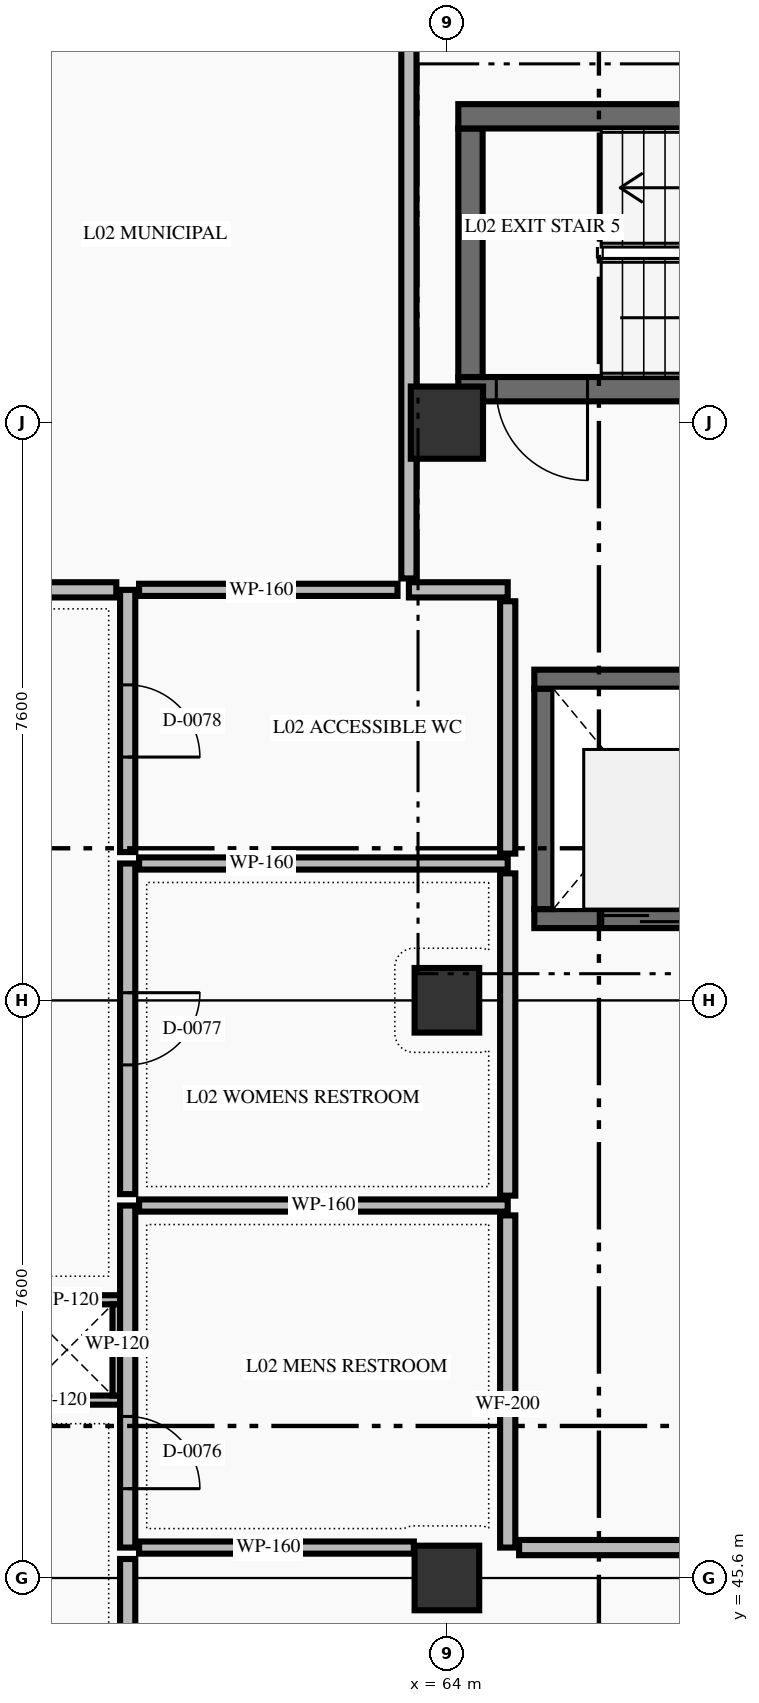
"""IFC4 building model, lengths in metres.
Left out: names, types, materials, properties, quantities, classifications, styles, units other than length and angle.
Written with IfcOpenShell. Run it as: python <this file> out.ifc"""

import sys

from ifc_helpers import new_model, si_unit, direction, frame, frame_2d, origin, origin_2d, place, context, subcontext, project, spatial, rectangle, extrude, element, fill, save


model = new_model("IFC4")
c1 = context("Model", 3, precision=1e-05, world=origin(), true_north=direction((0.0, 1.0)))
c2 = subcontext(c1, "Body", "Model", "MODEL_VIEW")
j1 = project(units=[si_unit("LENGTHUNIT", "METRE"), si_unit("PLANEANGLEUNIT", "RADIAN")], contexts=[c1])
p1 = place(None, origin())
s1 = spatial("IfcSite", under=j1, at=p1, CompositionType="ELEMENT")
p2 = place(p1, origin())
s2 = spatial("IfcBuilding", under=s1, at=p2, CompositionType="ELEMENT")
p3 = place(p2, frame((0.0, 0.0, 5.4)))
s3 = spatial("IfcBuildingStorey", under=s2, at=p3, CompositionType="ELEMENT", Elevation=5.4)
for number, where, z_axis, x_axis in (
    (1, (64.0, 45.6, 0.0), (0.0, 0.0, 1.0), (1.0, 0.0, 0.0)),
    (2, (64.0, 53.2, 0.0), (0.0, 0.0, 1.0), (1.0, 0.0, 0.0)),
):
    element("IfcColumn", number, at=place(p3, frame(where, z_axis=z_axis, x_axis=x_axis)), inside=s3, PredefinedType="COLUMN", context=c2, shape_type="SweptSolid", body=[
        extrude(rectangle(XDim=0.85, YDim=0.85, at=origin_2d()), origin(), (0.0, 0.0, 1.0), 4.8),
    ])
p4 = place(p3, frame((64.0, 60.8, 0.0), z_axis=(0.0, 0.0, 1.0), x_axis=(1.0, 0.0, 0.0)))
e3 = element("IfcColumn", 3, at=p4, inside=s3, PredefinedType="COLUMN", context=c2, shape_type="SweptSolid", body=[
    extrude(rectangle(XDim=0.95, YDim=0.95, at=origin_2d()), origin(), (0.0, 0.0, 1.0), 4.8),
])
p5 = place(p3, frame((71.85, 61.24, 0.0), z_axis=(0.0, 0.0, 1.0), x_axis=(-1.0, 0.0, 0.0)))
e4 = element("IfcWall", 4, at=p5, inside=s3, PredefinedType="SHEAR", context=c2, shape_type="SweptSolid", body=[
    extrude(rectangle(XDim=7.7, YDim=0.32, at=frame_2d((3.85, 0.0))), origin(), (0.0, 0.0, 1.0), 4.8),
])
p6 = place(p5, frame((6.0, 0.0, 0.0)))
e5 = element("IfcOpeningElement", 5, at=p6, cuts=e4, PredefinedType="OPENING", context=c2, shape_type="SweptSolid", body=[
    extrude(rectangle(XDim=1.2, YDim=2.2, at=frame_2d((0.6, 1.1))), frame((0.0, 0.17, 0.0), z_axis=(0.0, -1.0, 0.0), x_axis=(1.0, 0.0, 0.0)), (0.0, 0.0, 1.0), 0.34),
])
p7 = place(p3, frame((64.31, 61.4, 0.0), z_axis=(0.0, 0.0, 1.0), x_axis=(0.0, 1.0, 0.0)))
e6 = element("IfcWall", 6, at=p7, inside=s3, PredefinedType="SHEAR", context=c2, shape_type="SweptSolid", body=[
    extrude(rectangle(XDim=3.27, YDim=0.32, at=frame_2d((1.635, 0.0))), origin(), (0.0, 0.0, 1.0), 4.8),
])
p8 = place(p3, frame((64.15, 64.83, 0.0), z_axis=(0.0, 0.0, 1.0), x_axis=(1.0, 0.0, 0.0)))
e7 = element("IfcWall", 7, at=p8, inside=s3, PredefinedType="SHEAR", context=c2, shape_type="SweptSolid", body=[
    extrude(rectangle(XDim=7.7, YDim=0.32, at=frame_2d((3.85, 0.0))), origin(), (0.0, 0.0, 1.0), 4.8),
])
p9 = place(p3, frame((68.05, 54.275, 0.0), z_axis=(0.0, 0.0, 1.0), x_axis=(-1.0, 0.0, 0.0)))
e8 = element("IfcWall", 8, at=p9, inside=s3, PredefinedType="SHEAR", context=c2, shape_type="SweptSolid", body=[
    extrude(rectangle(XDim=2.9, YDim=0.25, at=frame_2d((1.45, 0.0))), origin(), (0.0, 0.0, 1.0), 4.8),
])
p10 = place(p9, frame((0.9, 0.0, 0.0)))
e9 = element("IfcOpeningElement", 9, at=p10, cuts=e8, PredefinedType="OPENING", context=c2, shape_type="SweptSolid", body=[
    extrude(rectangle(XDim=1.1, YDim=2.15, at=frame_2d((0.55, 1.075))), frame((0.0, 0.135, 0.0), z_axis=(0.0, -1.0, 0.0), x_axis=(1.0, 0.0, 0.0)), (0.0, 0.0, 1.0), 0.27),
])
for number, where, z_axis, x_axis in (
    (10, (65.275, 54.4, 0.0), (0.0, 0.0, 1.0), (0.0, 1.0, 0.0)),
    (11, (65.15, 57.425, 0.0), (0.0, 0.0, 1.0), (1.0, 0.0, 0.0)),
):
    element("IfcWall", number, at=place(p3, frame(where, z_axis=z_axis, x_axis=x_axis)), inside=s3, PredefinedType="SHEAR", context=c2, shape_type="SweptSolid", body=[
        extrude(rectangle(XDim=2.9, YDim=0.25, at=frame_2d((1.45, 0.0))), origin(), (0.0, 0.0, 1.0), 4.8),
    ])
for number, where, z_axis, x_axis in (
    (12, (59.72, 47.94, 0.0), (0.0, 0.0, 1.0), (-1.0, 0.0, 0.0)),
    (13, (58.28, 49.26, 0.0), (0.0, 0.0, 1.0), (1.0, 0.0, 0.0)),
):
    element("IfcWall", number, at=place(p3, frame(where, z_axis=z_axis, x_axis=x_axis)), inside=s3, PredefinedType="PARTITIONING", context=c2, shape_type="SweptSolid", body=[
        extrude(rectangle(XDim=1.44, YDim=0.12, at=frame_2d((0.72, 0.0))), origin(), (0.0, 0.0, 1.0), 4.54),
    ])
p11 = place(p3, frame((59.66, 49.2, 0.0), z_axis=(0.0, 0.0, 1.0), x_axis=(0.0, -1.0, 0.0)))
e14 = element("IfcWall", 14, at=p11, inside=s3, PredefinedType="PARTITIONING", context=c2, shape_type="SweptSolid", body=[
    extrude(rectangle(XDim=1.2, YDim=0.12, at=frame_2d((0.6, 0.0))), origin(), (0.0, 0.0, 1.0), 4.54),
])
p12 = place(p3, frame((59.8, 50.5, 0.0), z_axis=(0.0, 0.0, 1.0), x_axis=(0.0, -1.0, 0.0)))
e15 = element("IfcWall", 15, at=p12, inside=s3, PredefinedType="STANDARD", context=c2, shape_type="SweptSolid", body=[
    extrude(rectangle(XDim=4.5, YDim=0.2, at=frame_2d((2.25, 0.0))), origin(), (0.0, 0.0, 1.0), 4.04),
])
p13 = place(p12, frame((2.775, 0.0, 0.0)))
e16 = element("IfcOpeningElement", 16, at=p13, cuts=e15, PredefinedType="OPENING", context=c2, shape_type="SweptSolid", body=[
    extrude(rectangle(XDim=0.95, YDim=2.15, at=frame_2d((0.475, 1.075))), frame((0.0, 0.11, 0.0), z_axis=(0.0, -1.0, 0.0), x_axis=(1.0, 0.0, 0.0)), (0.0, 0.0, 1.0), 0.22),
])
p14 = place(p3, frame((59.8, 55.0, 0.0), z_axis=(0.0, 0.0, 1.0), x_axis=(0.0, -1.0, 0.0)))
e17 = element("IfcWall", 17, at=p14, inside=s3, PredefinedType="STANDARD", context=c2, shape_type="SweptSolid", body=[
    extrude(rectangle(XDim=4.35, YDim=0.2, at=frame_2d((2.175, 0.0))), origin(), (0.0, 0.0, 1.0), 4.04),
])
p15 = place(p14, frame((1.7, 0.0, 0.0)))
e18 = element("IfcOpeningElement", 18, at=p15, cuts=e17, PredefinedType="OPENING", context=c2, shape_type="SweptSolid", body=[
    extrude(rectangle(XDim=0.95, YDim=2.15, at=frame_2d((0.475, 1.075))), frame((0.0, 0.11, 0.0), z_axis=(0.0, -1.0, 0.0), x_axis=(1.0, 0.0, 0.0)), (0.0, 0.0, 1.0), 0.22),
])
p16 = place(p3, frame((59.8, 58.6, 0.0), z_axis=(0.0, 0.0, 1.0), x_axis=(0.0, -1.0, 0.0)))
e19 = element("IfcWall", 19, at=p16, inside=s3, PredefinedType="STANDARD", context=c2, shape_type="SweptSolid", body=[
    extrude(rectangle(XDim=3.45, YDim=0.2, at=frame_2d((1.725, 0.0))), origin(), (0.0, 0.0, 1.0), 4.04),
])
p17 = place(p16, frame((1.25, 0.0, 0.0)))
e20 = element("IfcOpeningElement", 20, at=p17, cuts=e19, PredefinedType="OPENING", context=c2, shape_type="SweptSolid", body=[
    extrude(rectangle(XDim=0.95, YDim=2.15, at=frame_2d((0.475, 1.075))), frame((0.0, 0.11, 0.0), z_axis=(0.0, -1.0, 0.0), x_axis=(1.0, 0.0, 0.0)), (0.0, 0.0, 1.0), 0.22),
])
p18 = place(p3, frame((59.8, 45.85, 0.0), z_axis=(0.0, 0.0, 1.0), x_axis=(0.0, -1.0, 0.0)))
e21 = element("IfcWall", 21, at=p18, inside=s3, PredefinedType="STANDARD", context=c2, shape_type="SweptSolid", body=[
    extrude(rectangle(XDim=15.45, YDim=0.2, at=frame_2d((7.725, 0.0))), origin(), (0.0, 0.0, 1.0), 4.04),
])
p19 = place(p18, frame((6.775, 0.0, 0.0)))
e22 = element("IfcOpeningElement", 22, at=p19, cuts=e21, PredefinedType="OPENING", context=c2, shape_type="SweptSolid", body=[
    extrude(rectangle(XDim=1.9, YDim=2.4, at=frame_2d((0.95, 1.2))), frame((0.0, 0.11, 0.0), z_axis=(0.0, -1.0, 0.0), x_axis=(1.0, 0.0, 0.0)), (0.0, 0.0, 1.0), 0.22),
])
p20 = place(p18, frame((8.775, 0.0, 0.0)))
e23 = element("IfcOpeningElement", 23, at=p20, cuts=e21, PredefinedType="OPENING", context=c2, shape_type="SweptSolid", body=[
    extrude(rectangle(XDim=1.9, YDim=2.4, at=frame_2d((0.95, 1.2))), frame((0.0, 0.11, 0.0), z_axis=(0.0, -1.0, 0.0), x_axis=(1.0, 0.0, 0.0)), (0.0, 0.0, 1.0), 0.22),
])
p21 = place(p3, frame((56.0, 58.6, 0.0), z_axis=(0.0, 0.0, 1.0), x_axis=(1.0, 0.0, 0.0)))
e24 = element("IfcWall", 24, at=p21, inside=s3, PredefinedType="STANDARD", context=c2, shape_type="SweptSolid", body=[
    extrude(rectangle(XDim=3.65, YDim=0.2, at=frame_2d((1.825, 0.0))), origin(), (0.0, 0.0, 1.0), 4.54),
])
p22 = place(p21, frame((1.3, 0.0, 0.0)))
e25 = element("IfcOpeningElement", 25, at=p22, cuts=e24, PredefinedType="OPENING", context=c2, shape_type="SweptSolid", body=[
    extrude(rectangle(XDim=1.05, YDim=2.15, at=frame_2d((0.525, 1.075))), frame((0.0, 0.11, 0.0), z_axis=(0.0, -1.0, 0.0), x_axis=(1.0, 0.0, 0.0)), (0.0, 0.0, 1.0), 0.22),
])
p23 = place(p3, frame((59.95, 50.5, 0.0), z_axis=(0.0, 0.0, 1.0), x_axis=(1.0, 0.0, 0.0)))
e26 = element("IfcWall", 26, at=p23, inside=s3, PredefinedType="PARTITIONING", context=c2, shape_type="SweptSolid", body=[
    extrude(rectangle(XDim=4.85, YDim=0.16, at=frame_2d((2.425, 0.0))), origin(), (0.0, 0.0, 1.0), 4.54),
])
p24 = place(p3, frame((63.565, 46.0, 0.0), z_axis=(0.0, 0.0, 1.0), x_axis=(-1.0, 0.0, 0.0)))
e27 = element("IfcWall", 27, at=p24, inside=s3, PredefinedType="PARTITIONING", context=c2, shape_type="SweptSolid", body=[
    extrude(rectangle(XDim=3.615, YDim=0.16, at=frame_2d((1.808, 0.0))), origin(), (0.0, 0.0, 1.0), 4.54),
])
p25 = place(p3, frame((64.8, 50.37, 0.0), z_axis=(0.0, 0.0, 1.0), x_axis=(0.0, -1.0, 0.0)))
e28 = element("IfcWall", 28, at=p25, inside=s3, PredefinedType="STANDARD", context=c2, shape_type="SweptSolid", body=[
    extrude(rectangle(XDim=4.37, YDim=0.2, at=frame_2d((2.185, 0.0))), origin(), (0.0, 0.0, 1.0), 4.54),
])
p26 = place(p3, frame((59.95, 55.0, 0.0), z_axis=(0.0, 0.0, 1.0), x_axis=(1.0, 0.0, 0.0)))
e29 = element("IfcWall", 29, at=p26, inside=s3, PredefinedType="PARTITIONING", context=c2, shape_type="SweptSolid", body=[
    extrude(rectangle(XDim=4.85, YDim=0.16, at=frame_2d((2.425, 0.0))), origin(), (0.0, 0.0, 1.0), 4.54),
])
p27 = place(p3, frame((64.8, 54.87, 0.0), z_axis=(0.0, 0.0, 1.0), x_axis=(0.0, -1.0, 0.0)))
e30 = element("IfcWall", 30, at=p27, inside=s3, PredefinedType="STANDARD", context=c2, shape_type="SweptSolid", body=[
    extrude(rectangle(XDim=4.24, YDim=0.2, at=frame_2d((2.12, 0.0))), origin(), (0.0, 0.0, 1.0), 4.54),
])
p28 = place(p3, frame((63.5, 58.6, 0.0), z_axis=(0.0, 0.0, 1.0), x_axis=(1.0, 0.0, 0.0)))
e31 = element("IfcWall", 31, at=p28, inside=s3, PredefinedType="STANDARD", context=c2, shape_type="SweptSolid", body=[
    extrude(rectangle(XDim=1.3, YDim=0.2, at=frame_2d((0.65, 0.0))), origin(), (0.0, 0.0, 1.0), 4.54),
])
p29 = place(p3, frame((64.8, 58.45, 0.0), z_axis=(0.0, 0.0, 1.0), x_axis=(0.0, -1.0, 0.0)))
e32 = element("IfcWall", 32, at=p29, inside=s3, PredefinedType="STANDARD", context=c2, shape_type="SweptSolid", body=[
    extrude(rectangle(XDim=3.32, YDim=0.2, at=frame_2d((1.66, 0.0))), origin(), (0.0, 0.0, 1.0), 4.54),
])
p30 = place(p3, frame((59.95, 58.6, 0.0), z_axis=(0.0, 0.0, 1.0), x_axis=(1.0, 0.0, 0.0)))
e33 = element("IfcWall", 33, at=p30, inside=s3, PredefinedType="PARTITIONING", context=c2, shape_type="SweptSolid", body=[
    extrude(rectangle(XDim=3.4, YDim=0.16, at=frame_2d((1.7, 0.0))), origin(), (0.0, 0.0, 1.0), 4.54),
])
p31 = place(p3, frame((64.95, 46.0, 0.0), z_axis=(0.0, 0.0, 1.0), x_axis=(1.0, 0.0, 0.0)))
e34 = element("IfcWall", 34, at=p31, inside=s3, PredefinedType="STANDARD", context=c2, shape_type="SweptSolid", body=[
    extrude(rectangle(XDim=7.05, YDim=0.2, at=frame_2d((3.525, 0.0))), origin(), (0.0, 0.0, 1.0), 4.54),
])
p32 = place(p31, frame((2.575, 0.0, 0.0)))
e35 = element("IfcOpeningElement", 35, at=p32, cuts=e34, PredefinedType="OPENING", context=c2, shape_type="SweptSolid", body=[
    extrude(rectangle(XDim=1.9, YDim=2.4, at=frame_2d((0.95, 1.2))), frame((0.0, 0.11, 0.0), z_axis=(0.0, -1.0, 0.0), x_axis=(1.0, 0.0, 0.0)), (0.0, 0.0, 1.0), 0.22),
])
p33 = place(p3, frame((63.5, 58.75, 0.0), z_axis=(0.0, 0.0, 1.0), x_axis=(0.0, 1.0, 0.0)))
e36 = element("IfcWall", 36, at=p33, inside=s3, PredefinedType="STANDARD", context=c2, shape_type="SweptSolid", body=[
    extrude(rectangle(XDim=9.65, YDim=0.2, at=frame_2d((4.825, 0.0))), origin(), (0.0, 0.0, 1.0), 4.54),
])
p34 = place(p33, frame((7.55, 0.0, 0.0)))
e37 = element("IfcOpeningElement", 37, at=p34, cuts=e36, PredefinedType="OPENING", context=c2, shape_type="SweptSolid", body=[
    extrude(rectangle(XDim=1.05, YDim=2.15, at=frame_2d((0.525, 1.075))), frame((0.0, 0.11, 0.0), z_axis=(0.0, -1.0, 0.0), x_axis=(1.0, 0.0, 0.0)), (0.0, 0.0, 1.0), 0.22),
])
p35 = place(p6, origin())
e38 = element("IfcDoor", 38, at=p35, inside=s3, OperationType="SINGLE_SWING_LEFT", PredefinedType="DOOR", context=c2, shape_type="SweptSolid", body=[
    extrude(rectangle(XDim=1.2, YDim=2.2, at=frame_2d((0.6, 1.1))), frame((0.0, 0.025, 0.0), z_axis=(0.0, -1.0, 0.0), x_axis=(1.0, 0.0, 0.0)), (0.0, 0.0, 1.0), 0.05),
])
fill(e5, e38)
p36 = place(p10, origin())
e39 = element("IfcDoor", 39, at=p36, inside=s3, OperationType="DOUBLE_DOOR_SLIDING", PredefinedType="DOOR", context=c2, shape_type="SweptSolid", body=[
    extrude(rectangle(XDim=1.1, YDim=2.15, at=frame_2d((0.55, 1.075))), frame((0.0, 0.025, 0.0), z_axis=(0.0, -1.0, 0.0), x_axis=(1.0, 0.0, 0.0)), (0.0, 0.0, 1.0), 0.05),
])
fill(e9, e39)
p37 = place(p13, origin())
e40 = element("IfcDoor", 40, at=p37, inside=s3, OperationType="SINGLE_SWING_RIGHT", PredefinedType="DOOR", context=c2, shape_type="SweptSolid", body=[
    extrude(rectangle(XDim=0.95, YDim=2.15, at=frame_2d((0.475, 1.075))), frame((0.0, 0.025, 0.0), z_axis=(0.0, -1.0, 0.0), x_axis=(1.0, 0.0, 0.0)), (0.0, 0.0, 1.0), 0.05),
])
fill(e16, e40)
p38 = place(p15, origin())
e41 = element("IfcDoor", 41, at=p38, inside=s3, OperationType="SINGLE_SWING_LEFT", PredefinedType="DOOR", context=c2, shape_type="SweptSolid", body=[
    extrude(rectangle(XDim=0.95, YDim=2.15, at=frame_2d((0.475, 1.075))), frame((0.0, 0.025, 0.0), z_axis=(0.0, -1.0, 0.0), x_axis=(1.0, 0.0, 0.0)), (0.0, 0.0, 1.0), 0.05),
])
fill(e18, e41)
p39 = place(p17, origin())
e42 = element("IfcDoor", 42, at=p39, inside=s3, OperationType="SINGLE_SWING_RIGHT", PredefinedType="DOOR", context=c2, shape_type="SweptSolid", body=[
    extrude(rectangle(XDim=0.95, YDim=2.15, at=frame_2d((0.475, 1.075))), frame((0.0, 0.025, 0.0), z_axis=(0.0, -1.0, 0.0), x_axis=(1.0, 0.0, 0.0)), (0.0, 0.0, 1.0), 0.05),
])
fill(e20, e42)
save(model, sys.argv[1])
